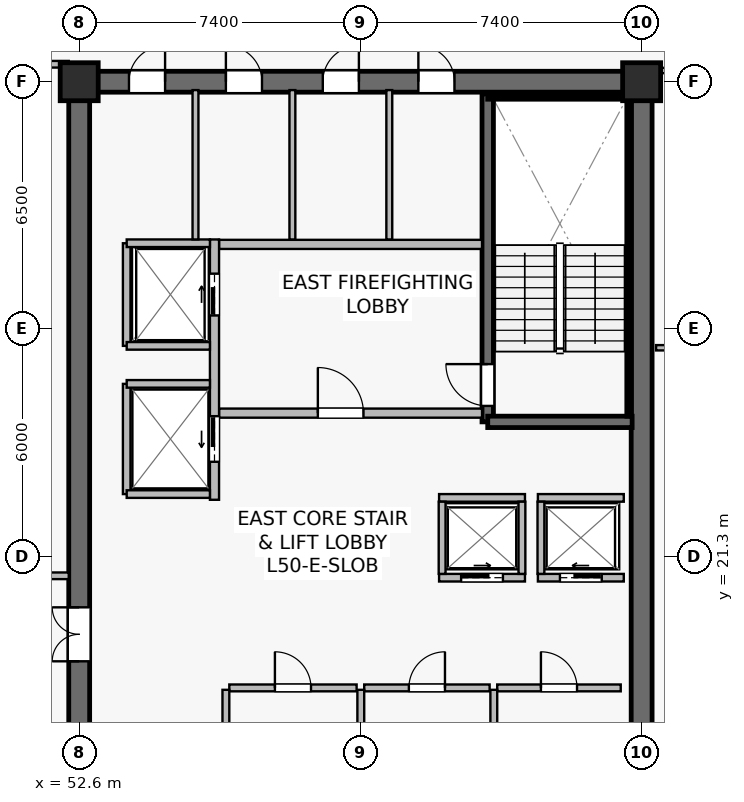
"""IFC4 building model, lengths in metres.
Left out: names, types, materials, properties, quantities, classifications, styles, units other than length and angle.
Written with IfcOpenShell. Run it as: python <this file> out.ifc"""

import sys

from ifc_helpers import new_model, si_unit, direction, frame, frame_2d, origin, origin_2d, place, context, subcontext, project, spatial, rectangle, extrude, source, transform, mapped, element, fill, save


model = new_model("IFC4")
c1 = context("Model", 3, precision=1e-05, world=origin(), true_north=direction((0.0, 1.0)))
c2 = subcontext(c1, "Body", "Model", "MODEL_VIEW")
j1 = project(units=[si_unit("LENGTHUNIT", "METRE"), si_unit("PLANEANGLEUNIT", "RADIAN")], contexts=[c1])
p1 = place(None, origin())
s1 = spatial("IfcSite", under=j1, at=p1, CompositionType="ELEMENT")
p2 = place(p1, origin())
s2 = spatial("IfcBuilding", under=s1, at=p2, CompositionType="ELEMENT")
p3 = place(p2, frame((0.0, 0.0, 209.6)))
s3 = spatial("IfcBuildingStorey", under=s2, at=p3, CompositionType="ELEMENT", Elevation=209.6)
p4 = place(p3, frame((52.325, 33.8, 0.0), z_axis=(0.0, 0.0, 1.0), x_axis=(1.0, 0.0, 0.0)))
e1 = element("IfcWall", 1, at=p4, inside=s3, PredefinedType="SHEAR", context=c2, shape_type="SweptSolid", body=[
    extrude(rectangle(XDim=15.35, YDim=0.55, at=frame_2d((7.675, 0.0))), origin(), (0.0, 0.0, 1.0), 3.8),
])
p5 = place(p4, frame((9.2, 0.0, 0.0)))
e2 = element("IfcOpeningElement", 2, at=p5, cuts=e1, PredefinedType="OPENING", context=c2, shape_type="SweptSolid", body=[
    extrude(rectangle(XDim=0.95, YDim=2.15, at=frame_2d((0.475, 1.075))), frame((0.0, 0.285, 0.0), z_axis=(0.0, -1.0, 0.0), x_axis=(1.0, 0.0, 0.0)), (0.0, 0.0, 1.0), 0.57),
])
p6 = place(p4, frame((6.685, 0.0, 0.0)))
e3 = element("IfcOpeningElement", 3, at=p6, cuts=e1, PredefinedType="OPENING", context=c2, shape_type="SweptSolid", body=[
    extrude(rectangle(XDim=0.95, YDim=2.15, at=frame_2d((0.475, 1.075))), frame((0.0, 0.285, 0.0), z_axis=(0.0, -1.0, 0.0), x_axis=(1.0, 0.0, 0.0)), (0.0, 0.0, 1.0), 0.57),
])
p7 = place(p4, frame((4.135, 0.0, 0.0)))
e4 = element("IfcOpeningElement", 4, at=p7, cuts=e1, PredefinedType="OPENING", context=c2, shape_type="SweptSolid", body=[
    extrude(rectangle(XDim=0.95, YDim=2.15, at=frame_2d((0.475, 1.075))), frame((0.0, 0.285, 0.0), z_axis=(0.0, -1.0, 0.0), x_axis=(1.0, 0.0, 0.0)), (0.0, 0.0, 1.0), 0.57),
])
p8 = place(p4, frame((1.585, 0.0, 0.0)))
e5 = element("IfcOpeningElement", 5, at=p8, cuts=e1, PredefinedType="OPENING", context=c2, shape_type="SweptSolid", body=[
    extrude(rectangle(XDim=0.95, YDim=2.15, at=frame_2d((0.475, 1.075))), frame((0.0, 0.285, 0.0), z_axis=(0.0, -1.0, 0.0), x_axis=(1.0, 0.0, 0.0)), (0.0, 0.0, 1.0), 0.57),
])
p9 = place(p3, frame((52.6, 15.075, 0.0), z_axis=(0.0, 0.0, 1.0), x_axis=(0.0, 1.0, 0.0)))
e6 = element("IfcWall", 6, at=p9, inside=s3, PredefinedType="SHEAR", context=c2, shape_type="SweptSolid", body=[
    extrude(rectangle(XDim=18.45, YDim=0.55, at=frame_2d((9.225, 0.0))), origin(), (0.0, 0.0, 1.0), 3.8),
])
p10 = place(p9, frame((3.475, 0.0, 0.0)))
e7 = element("IfcOpeningElement", 7, at=p10, cuts=e6, PredefinedType="OPENING", context=c2, shape_type="SweptSolid", body=[
    extrude(rectangle(XDim=1.42, YDim=2.2, at=frame_2d((0.71, 1.1))), frame((0.0, 0.285, 0.0), z_axis=(0.0, -1.0, 0.0), x_axis=(1.0, 0.0, 0.0)), (0.0, 0.0, 1.0), 0.57),
])
p11 = place(p3, frame((67.4, 15.075, 0.0), z_axis=(0.0, 0.0, 1.0), x_axis=(0.0, 1.0, 0.0)))
e8 = element("IfcWall", 8, at=p11, inside=s3, PredefinedType="SHEAR", context=c2, shape_type="SweptSolid", body=[
    extrude(rectangle(XDim=18.45, YDim=0.55, at=frame_2d((9.225, 0.0))), origin(), (0.0, 0.0, 1.0), 3.8),
])
p12 = place(p3, frame((63.35, 24.85, 0.0), z_axis=(0.0, 0.0, 1.0), x_axis=(0.0, 1.0, 0.0)))
e9 = element("IfcWall", 9, at=p12, inside=s3, PredefinedType="SHEAR", context=c2, shape_type="SweptSolid", body=[
    extrude(rectangle(XDim=8.63, YDim=0.3, at=frame_2d((4.315, 0.0))), origin(), (0.0, 0.0, 1.0), 3.8),
])
p13 = place(p12, frame((0.42, 0.0, 0.0)))
e10 = element("IfcOpeningElement", 10, at=p13, cuts=e9, PredefinedType="OPENING", context=c2, shape_type="SweptSolid", body=[
    extrude(rectangle(XDim=1.1, YDim=2.15, at=frame_2d((0.55, 1.075))), frame((0.0, 0.16, 0.0), z_axis=(0.0, -1.0, 0.0), x_axis=(1.0, 0.0, 0.0)), (0.0, 0.0, 1.0), 0.32),
])
p14 = place(p3, frame((63.35, 24.85, 0.0), z_axis=(0.0, 0.0, 1.0), x_axis=(1.0, 0.0, 0.0)))
e11 = element("IfcWall", 11, at=p14, inside=s3, PredefinedType="SHEAR", context=c2, shape_type="SweptSolid", body=[
    extrude(rectangle(XDim=3.8, YDim=0.3, at=frame_2d((1.9, 0.0))), origin(), (0.0, 0.0, 1.0), 3.8),
])
p15 = place(p3, frame((63.35, 33.4, 0.0), z_axis=(0.0, 0.0, 1.0), x_axis=(1.0, 0.0, 0.0)))
e12 = element("IfcWall", 12, at=p15, inside=s3, PredefinedType="SOLIDWALL", context=c2, shape_type="SweptSolid", body=[
    extrude(rectangle(XDim=3.72, YDim=0.12, at=frame_2d((1.86, 0.0))), origin(), (0.0, 0.0, 1.0), 3.8),
])
p16 = place(p3, frame((67.07, 25.0, 0.0), z_axis=(0.0, 0.0, 1.0), x_axis=(0.0, 1.0, 0.0)))
e13 = element("IfcWall", 13, at=p16, inside=s3, PredefinedType="SOLIDWALL", context=c2, shape_type="SweptSolid", body=[
    extrude(rectangle(XDim=8.32, YDim=0.12, at=frame_2d((4.16, 0.0))), origin(), (0.0, 0.0, 1.0), 3.8),
])
m1 = source(origin(), c2, "Body", "SweptSolid", [
    extrude(rectangle(XDim=1.0, YDim=1.0, at=origin_2d()), origin(), (0.0, 0.0, 1.0), 4.1),
])
for number, where, z_axis, x_axis in (
    (14, (52.6, 33.8, 0.0), (0.0, 0.0, 1.0), (1.0, 0.0, 0.0)),
    (15, (67.4, 33.8, 0.0), (0.0, 0.0, 1.0), (1.0, 0.0, 0.0)),
):
    element("IfcColumn", number, at=place(p3, frame(where, z_axis=z_axis, x_axis=x_axis)), inside=s3, PredefinedType="COLUMN", context=c2, shape_type="MappedRepresentation", body=[
        mapped(m1, transform((0.0, 0.0, 0.0), scale=1.0)),
    ])
p17 = place(p3, frame((56.28, 25.08, 0.0), z_axis=(0.0, 0.0, 1.0), x_axis=(1.0, 0.0, 0.0)))
e16 = element("IfcWall", 16, at=p17, inside=s3, PredefinedType="SOLIDWALL", context=c2, shape_type="SweptSolid", body=[
    extrude(rectangle(XDim=6.92, YDim=0.24, at=frame_2d((3.46, 0.0))), origin(), (0.0, 0.0, 1.0), 3.197),
])
p18 = place(p17, frame((2.6, 0.0, 0.0)))
e17 = element("IfcOpeningElement", 17, at=p18, cuts=e16, PredefinedType="OPENING", context=c2, shape_type="SweptSolid", body=[
    extrude(rectangle(XDim=1.2, YDim=2.16, at=frame_2d((0.6, 1.08))), frame((0.0, 0.13, 0.0), z_axis=(0.0, -1.0, 0.0), x_axis=(1.0, 0.0, 0.0)), (0.0, 0.0, 1.0), 0.26),
])
p19 = place(p3, frame((56.28, 29.52, 0.0), z_axis=(0.0, 0.0, 1.0), x_axis=(1.0, 0.0, 0.0)))
e18 = element("IfcWall", 18, at=p19, inside=s3, PredefinedType="SOLIDWALL", context=c2, shape_type="SweptSolid", body=[
    extrude(rectangle(XDim=6.92, YDim=0.24, at=frame_2d((3.46, 0.0))), origin(), (0.0, 0.0, 1.0), 3.197),
])
p20 = place(p3, frame((56.16, 22.8, 0.0), z_axis=(0.0, 0.0, 1.0), x_axis=(0.0, 1.0, 0.0)))
e19 = element("IfcWall", 19, at=p20, inside=s3, PredefinedType="SOLIDWALL", context=c2, shape_type="SweptSolid", body=[
    extrude(rectangle(XDim=6.85, YDim=0.24, at=frame_2d((3.425, 0.0))), origin(), (0.0, 0.0, 1.0), 2.935),
])
p21 = place(p20, frame((4.85, 0.0, 0.0)))
e20 = element("IfcOpeningElement", 20, at=p21, cuts=e19, PredefinedType="OPENING", context=c2, shape_type="SweptSolid", body=[
    extrude(rectangle(XDim=1.1, YDim=2.22, at=frame_2d((0.55, 1.11))), frame((0.0, 0.13, 0.0), z_axis=(0.0, -1.0, 0.0), x_axis=(1.0, 0.0, 0.0)), (0.0, 0.0, 1.0), 0.26),
])
p22 = place(p20, frame((1.0, 0.0, 0.0)))
e21 = element("IfcOpeningElement", 21, at=p22, cuts=e19, PredefinedType="OPENING", context=c2, shape_type="SweptSolid", body=[
    extrude(rectangle(XDim=1.2, YDim=2.22, at=frame_2d((0.6, 1.11))), frame((0.0, 0.13, 0.0), z_axis=(0.0, -1.0, 0.0), x_axis=(1.0, 0.0, 0.0)), (0.0, 0.0, 1.0), 0.26),
])
p23 = place(p3, frame((64.67, 20.75, 0.0), z_axis=(0.0, 0.0, 1.0), x_axis=(1.0, 0.0, 0.0)))
e22 = element("IfcWall", 22, at=p23, inside=s3, PredefinedType="SOLIDWALL", context=c2, shape_type="SweptSolid", body=[
    extrude(rectangle(XDim=2.26, YDim=0.2, at=frame_2d((1.13, 0.0))), origin(), (0.0, 0.0, 1.0), 3.8),
])
p24 = place(p23, frame((0.58, 0.0, 0.0)))
e23 = element("IfcOpeningElement", 23, at=p24, cuts=e22, PredefinedType="OPENING", context=c2, shape_type="SweptSolid", body=[
    extrude(rectangle(XDim=1.1, YDim=2.22, at=frame_2d((0.55, 1.11))), frame((0.0, 0.11, 0.0), z_axis=(0.0, -1.0, 0.0), x_axis=(1.0, 0.0, 0.0)), (0.0, 0.0, 1.0), 0.22),
])
p25 = place(p3, frame((64.67, 22.85, 0.0), z_axis=(0.0, 0.0, 1.0), x_axis=(1.0, 0.0, 0.0)))
e24 = element("IfcWall", 24, at=p25, inside=s3, PredefinedType="SOLIDWALL", context=c2, shape_type="SweptSolid", body=[
    extrude(rectangle(XDim=2.26, YDim=0.2, at=frame_2d((1.13, 0.0))), origin(), (0.0, 0.0, 1.0), 3.8),
])
p26 = place(p3, frame((64.75, 20.85, 0.0), z_axis=(0.0, 0.0, 1.0), x_axis=(0.0, 1.0, 0.0)))
e25 = element("IfcWall", 25, at=p26, inside=s3, PredefinedType="SOLIDWALL", context=c2, shape_type="SweptSolid", body=[
    extrude(rectangle(XDim=1.9, YDim=0.18, at=frame_2d((0.95, 0.0))), origin(), (0.0, 0.0, 1.0), 3.8),
])
p27 = place(p3, frame((62.07, 20.75, 0.0), z_axis=(0.0, 0.0, 1.0), x_axis=(1.0, 0.0, 0.0)))
e26 = element("IfcWall", 26, at=p27, inside=s3, PredefinedType="SOLIDWALL", context=c2, shape_type="SweptSolid", body=[
    extrude(rectangle(XDim=2.26, YDim=0.2, at=frame_2d((1.13, 0.0))), origin(), (0.0, 0.0, 1.0), 3.8),
])
p28 = place(p27, frame((0.58, 0.0, 0.0)))
e27 = element("IfcOpeningElement", 27, at=p28, cuts=e26, PredefinedType="OPENING", context=c2, shape_type="SweptSolid", body=[
    extrude(rectangle(XDim=1.1, YDim=2.22, at=frame_2d((0.55, 1.11))), frame((0.0, 0.11, 0.0), z_axis=(0.0, -1.0, 0.0), x_axis=(1.0, 0.0, 0.0)), (0.0, 0.0, 1.0), 0.22),
])
p29 = place(p3, frame((62.07, 22.85, 0.0), z_axis=(0.0, 0.0, 1.0), x_axis=(1.0, 0.0, 0.0)))
e28 = element("IfcWall", 28, at=p29, inside=s3, PredefinedType="SOLIDWALL", context=c2, shape_type="SweptSolid", body=[
    extrude(rectangle(XDim=2.26, YDim=0.2, at=frame_2d((1.13, 0.0))), origin(), (0.0, 0.0, 1.0), 3.8),
])
for number, where, z_axis, x_axis in (
    (29, (62.15, 20.85, 0.0), (0.0, 0.0, 1.0), (0.0, 1.0, 0.0)),
    (30, (64.25, 20.85, 0.0), (0.0, 0.0, 1.0), (0.0, 1.0, 0.0)),
):
    element("IfcWall", number, at=place(p3, frame(where, z_axis=z_axis, x_axis=x_axis)), inside=s3, PredefinedType="SOLIDWALL", context=c2, shape_type="SweptSolid", body=[
        extrude(rectangle(XDim=1.9, YDim=0.18, at=frame_2d((0.95, 0.0))), origin(), (0.0, 0.0, 1.0), 3.8),
    ])
p30 = place(p3, frame((53.85, 26.85, 0.0), z_axis=(0.0, 0.0, 1.0), x_axis=(0.0, 1.0, 0.0)))
e31 = element("IfcWall", 31, at=p30, inside=s3, PredefinedType="SOLIDWALL", context=c2, shape_type="SweptSolid", body=[
    extrude(rectangle(XDim=2.7, YDim=0.2, at=frame_2d((1.35, 0.0))), origin(), (0.0, 0.0, 1.0), 3.8),
])
p31 = place(p3, frame((53.85, 29.55, 0.0), z_axis=(0.0, 0.0, 1.0), x_axis=(1.0, 0.0, 0.0)))
e32 = element("IfcWall", 32, at=p31, inside=s3, PredefinedType="SOLIDWALL", context=c2, shape_type="SweptSolid", body=[
    extrude(rectangle(XDim=2.19, YDim=0.2, at=frame_2d((1.095, 0.0))), origin(), (0.0, 0.0, 1.0), 3.8),
])
p32 = place(p3, frame((53.85, 26.85, 0.0), z_axis=(0.0, 0.0, 1.0), x_axis=(1.0, 0.0, 0.0)))
e33 = element("IfcWall", 33, at=p32, inside=s3, PredefinedType="SOLIDWALL", context=c2, shape_type="SweptSolid", body=[
    extrude(rectangle(XDim=2.19, YDim=0.2, at=frame_2d((1.095, 0.0))), origin(), (0.0, 0.0, 1.0), 3.197),
])
p33 = place(p3, frame((53.85, 22.95, 0.0), z_axis=(0.0, 0.0, 1.0), x_axis=(0.0, 1.0, 0.0)))
e34 = element("IfcWall", 34, at=p33, inside=s3, PredefinedType="SOLIDWALL", context=c2, shape_type="SweptSolid", body=[
    extrude(rectangle(XDim=2.9, YDim=0.2, at=frame_2d((1.45, 0.0))), origin(), (0.0, 0.0, 1.0), 2.935),
])
for number, where, z_axis, x_axis in (
    (35, (53.85, 25.85, 0.0), (0.0, 0.0, 1.0), (1.0, 0.0, 0.0)),
    (36, (53.85, 22.95, 0.0), (0.0, 0.0, 1.0), (1.0, 0.0, 0.0)),
):
    element("IfcWall", number, at=place(p3, frame(where, z_axis=z_axis, x_axis=x_axis)), inside=s3, PredefinedType="SOLIDWALL", context=c2, shape_type="SweptSolid", body=[
        extrude(rectangle(XDim=2.19, YDim=0.2, at=frame_2d((1.095, 0.0))), origin(), (0.0, 0.0, 1.0), 3.8),
    ])
p34 = place(p3, frame((63.6, 17.85, 0.0), z_axis=(0.0, 0.0, 1.0), x_axis=(1.0, 0.0, 0.0)))
e37 = element("IfcWall", 37, at=p34, inside=s3, PredefinedType="SOLIDWALL", context=c2, shape_type="SweptSolid", body=[
    extrude(rectangle(XDim=3.25, YDim=0.18, at=frame_2d((1.625, 0.0))), origin(), (0.0, 0.0, 1.0), 3.8),
])
p35 = place(p34, frame((1.15, 0.0, 0.0)))
e38 = element("IfcOpeningElement", 38, at=p35, cuts=e37, PredefinedType="OPENING", context=c2, shape_type="SweptSolid", body=[
    extrude(rectangle(XDim=0.95, YDim=2.15, at=frame_2d((0.475, 1.075))), frame((0.0, 0.1, 0.0), z_axis=(0.0, -1.0, 0.0), x_axis=(1.0, 0.0, 0.0)), (0.0, 0.0, 1.0), 0.2),
])
p36 = place(p3, frame((63.51, 15.4, 0.0), z_axis=(0.0, 0.0, 1.0), x_axis=(0.0, 1.0, 0.0)))
e39 = element("IfcWall", 39, at=p36, inside=s3, PredefinedType="SOLIDWALL", context=c2, shape_type="SweptSolid", body=[
    extrude(rectangle(XDim=2.4, YDim=0.18, at=frame_2d((1.2, 0.0))), origin(), (0.0, 0.0, 1.0), 3.8),
])
p37 = place(p3, frame((60.1, 17.85, 0.0), z_axis=(0.0, 0.0, 1.0), x_axis=(1.0, 0.0, 0.0)))
e40 = element("IfcWall", 40, at=p37, inside=s3, PredefinedType="SOLIDWALL", context=c2, shape_type="SweptSolid", body=[
    extrude(rectangle(XDim=3.3, YDim=0.18, at=frame_2d((1.65, 0.0))), origin(), (0.0, 0.0, 1.0), 3.197),
])
p38 = place(p37, frame((1.175, 0.0, 0.0)))
e41 = element("IfcOpeningElement", 41, at=p38, cuts=e40, PredefinedType="OPENING", context=c2, shape_type="SweptSolid", body=[
    extrude(rectangle(XDim=0.95, YDim=2.15, at=frame_2d((0.475, 1.075))), frame((0.0, 0.1, 0.0), z_axis=(0.0, -1.0, 0.0), x_axis=(1.0, 0.0, 0.0)), (0.0, 0.0, 1.0), 0.2),
])
p39 = place(p3, frame((60.01, 15.4, 0.0), z_axis=(0.0, 0.0, 1.0), x_axis=(0.0, 1.0, 0.0)))
e42 = element("IfcWall", 42, at=p39, inside=s3, PredefinedType="SOLIDWALL", context=c2, shape_type="SweptSolid", body=[
    extrude(rectangle(XDim=2.4, YDim=0.18, at=frame_2d((1.2, 0.0))), origin(), (0.0, 0.0, 1.0), 3.197),
])
p40 = place(p3, frame((56.55, 17.85, 0.0), z_axis=(0.0, 0.0, 1.0), x_axis=(1.0, 0.0, 0.0)))
e43 = element("IfcWall", 43, at=p40, inside=s3, PredefinedType="SOLIDWALL", context=c2, shape_type="SweptSolid", body=[
    extrude(rectangle(XDim=3.35, YDim=0.18, at=frame_2d((1.675, 0.0))), origin(), (0.0, 0.0, 1.0), 3.197),
])
p41 = place(p40, frame((1.2, 0.0, 0.0)))
e44 = element("IfcOpeningElement", 44, at=p41, cuts=e43, PredefinedType="OPENING", context=c2, shape_type="SweptSolid", body=[
    extrude(rectangle(XDim=0.95, YDim=2.15, at=frame_2d((0.475, 1.075))), frame((0.0, 0.1, 0.0), z_axis=(0.0, -1.0, 0.0), x_axis=(1.0, 0.0, 0.0)), (0.0, 0.0, 1.0), 0.2),
])
p42 = place(p3, frame((56.46, 15.4, 0.0), z_axis=(0.0, 0.0, 1.0), x_axis=(0.0, 1.0, 0.0)))
e45 = element("IfcWall", 45, at=p42, inside=s3, PredefinedType="SOLIDWALL", context=c2, shape_type="SweptSolid", body=[
    extrude(rectangle(XDim=2.4, YDim=0.18, at=frame_2d((1.2, 0.0))), origin(), (0.0, 0.0, 1.0), 3.8),
])
for number, where, z_axis, x_axis in (
    (46, (60.76, 29.65, 0.0), (0.0, 0.0, 1.0), (0.0, 1.0, 0.0)),
    (47, (58.21, 29.65, 0.0), (0.0, 0.0, 1.0), (0.0, 1.0, 0.0)),
    (48, (55.66, 29.65, 0.0), (0.0, 0.0, 1.0), (0.0, 1.0, 0.0)),
):
    element("IfcWall", number, at=place(p3, frame(where, z_axis=z_axis, x_axis=x_axis)), inside=s3, PredefinedType="PLUMBINGWALL", context=c2, shape_type="SweptSolid", body=[
        extrude(rectangle(XDim=3.93, YDim=0.155, at=frame_2d((1.965, 0.0))), origin(), (0.0, 0.0, 1.0), 3.8),
    ])
p43 = place(p3, frame((48.3, 34.26, 0.0), z_axis=(0.0, 0.0, 1.0), x_axis=(1.0, 0.0, 0.0)))
e49 = element("IfcWall", 49, at=p43, inside=s3, PredefinedType="PARTITIONING", context=c2, shape_type="SweptSolid", body=[
    extrude(rectangle(XDim=4.025, YDim=0.175, at=frame_2d((2.012, 0.0))), origin(), (0.0, 0.0, 1.0), 3.485),
])
p44 = place(p3, frame((48.3, 20.8, 0.0), z_axis=(0.0, 0.0, 1.0), x_axis=(1.0, 0.0, 0.0)))
e50 = element("IfcWall", 50, at=p44, inside=s3, PredefinedType="PARTITIONING", context=c2, shape_type="SweptSolid", body=[
    extrude(rectangle(XDim=4.025, YDim=0.175, at=frame_2d((2.012, 0.0))), origin(), (0.0, 0.0, 1.0), 3.8),
])
p45 = place(p44, frame((1.35, 0.0, 0.0)))
e51 = element("IfcOpeningElement", 51, at=p45, cuts=e50, PredefinedType="OPENING", context=c2, shape_type="SweptSolid", body=[
    extrude(rectangle(XDim=0.95, YDim=2.15, at=frame_2d((0.475, 1.075))), frame((0.0, 0.098, 0.0), z_axis=(0.0, -1.0, 0.0), x_axis=(1.0, 0.0, 0.0)), (0.0, 0.0, 1.0), 0.195),
])
p46 = place(p3, frame((67.78, 26.8, 0.0), z_axis=(0.0, 0.0, 1.0), x_axis=(1.0, 0.0, 0.0)))
e52 = element("IfcWall", 52, at=p46, inside=s3, PredefinedType="PARTITIONING", context=c2, shape_type="SweptSolid", body=[
    extrude(rectangle(XDim=2.91, YDim=0.14, at=frame_2d((1.455, 0.0))), origin(), (0.0, 0.0, 1.0), 3.8),
])
p47 = place(p3, frame((67.78, 34.095, 0.0), z_axis=(0.0, 0.0, 1.0), x_axis=(1.0, 0.0, 0.0)))
e53 = element("IfcWall", 53, at=p47, inside=s3, PredefinedType="PARTITIONING", context=c2, shape_type="SweptSolid", body=[
    extrude(rectangle(XDim=2.91, YDim=0.14, at=frame_2d((1.455, 0.0))), origin(), (0.0, 0.0, 1.0), 3.8),
])
p48 = place(p47, frame((1.005, 0.0, 0.0)))
e54 = element("IfcOpeningElement", 54, at=p48, cuts=e53, PredefinedType="OPENING", context=c2, shape_type="SweptSolid", body=[
    extrude(rectangle(XDim=0.9, YDim=2.1, at=frame_2d((0.45, 1.05))), frame((0.0, 0.08, 0.0), z_axis=(0.0, -1.0, 0.0), x_axis=(1.0, 0.0, 0.0)), (0.0, 0.0, 1.0), 0.16),
])
m2 = source(origin(), c2, "Body", "SweptSolid", [
    extrude(rectangle(XDim=1.1, YDim=2.15, at=frame_2d((0.55, 1.075))), frame((0.0, 0.025, 0.0), z_axis=(0.0, -1.0, 0.0), x_axis=(1.0, 0.0, 0.0)), (0.0, 0.0, 1.0), 0.05),
])
p49 = place(p13, origin())
e55 = element("IfcDoor", 55, at=p49, inside=s3, OperationType="SINGLE_SWING_RIGHT", PredefinedType="DOOR", context=c2, shape_type="MappedRepresentation", body=[
    mapped(m2, transform((0.0, 0.0, 0.0), scale=1.0)),
])
fill(e10, e55)
m3 = source(origin(), c2, "Body", "SweptSolid", [
    extrude(rectangle(XDim=1.2, YDim=2.16, at=frame_2d((0.6, 1.08))), frame((0.0, 0.025, 0.0), z_axis=(0.0, -1.0, 0.0), x_axis=(1.0, 0.0, 0.0)), (0.0, 0.0, 1.0), 0.05),
])
p50 = place(p18, origin())
e56 = element("IfcDoor", 56, at=p50, inside=s3, OperationType="SINGLE_SWING_LEFT", PredefinedType="DOOR", context=c2, shape_type="MappedRepresentation", body=[
    mapped(m3, transform((0.0, 0.0, 0.0), scale=1.0)),
])
fill(e17, e56)
m4 = source(origin(), c2, "Body", "SweptSolid", [
    extrude(rectangle(XDim=1.1, YDim=2.22, at=frame_2d((0.55, 1.11))), frame((0.0, 0.025, 0.0), z_axis=(0.0, -1.0, 0.0), x_axis=(1.0, 0.0, 0.0)), (0.0, 0.0, 1.0), 0.05),
])
p51 = place(p24, origin())
e57 = element("IfcDoor", 57, at=p51, inside=s3, OperationType="SLIDING_TO_LEFT", PredefinedType="USERDEFINED", context=c2, shape_type="MappedRepresentation", body=[
    mapped(m4, transform((0.0, 0.0, 0.0), scale=1.0)),
])
fill(e23, e57)
p52 = place(p28, origin())
e58 = element("IfcDoor", 58, at=p52, inside=s3, OperationType="SLIDING_TO_RIGHT", PredefinedType="USERDEFINED", context=c2, shape_type="MappedRepresentation", body=[
    mapped(m4, transform((0.0, 0.0, 0.0), scale=1.0)),
])
fill(e27, e58)
p53 = place(p21, origin())
e59 = element("IfcDoor", 59, at=p53, inside=s3, OperationType="SLIDING_TO_RIGHT", PredefinedType="USERDEFINED", context=c2, shape_type="MappedRepresentation", body=[
    mapped(m4, transform((0.0, 0.0, 0.0), scale=1.0)),
])
fill(e20, e59)
m5 = source(origin(), c2, "Body", "SweptSolid", [
    extrude(rectangle(XDim=1.2, YDim=2.22, at=frame_2d((0.6, 1.11))), frame((0.0, 0.025, 0.0), z_axis=(0.0, -1.0, 0.0), x_axis=(1.0, 0.0, 0.0)), (0.0, 0.0, 1.0), 0.05),
])
p54 = place(p22, origin())
e60 = element("IfcDoor", 60, at=p54, inside=s3, OperationType="SLIDING_TO_LEFT", PredefinedType="USERDEFINED", context=c2, shape_type="MappedRepresentation", body=[
    mapped(m5, transform((0.0, 0.0, 0.0), scale=1.0)),
])
fill(e21, e60)
m6 = source(origin(), c2, "Body", "SweptSolid", [
    extrude(rectangle(XDim=0.95, YDim=2.15, at=frame_2d((0.475, 1.075))), frame((0.0, 0.025, 0.0), z_axis=(0.0, -1.0, 0.0), x_axis=(1.0, 0.0, 0.0)), (0.0, 0.0, 1.0), 0.05),
])
p55 = place(p35, origin())
e61 = element("IfcDoor", 61, at=p55, inside=s3, OperationType="SINGLE_SWING_LEFT", PredefinedType="DOOR", context=c2, shape_type="MappedRepresentation", body=[
    mapped(m6, transform((0.0, 0.0, 0.0), scale=1.0)),
])
fill(e38, e61)
p56 = place(p38, origin())
e62 = element("IfcDoor", 62, at=p56, inside=s3, OperationType="SINGLE_SWING_RIGHT", PredefinedType="DOOR", context=c2, shape_type="MappedRepresentation", body=[
    mapped(m6, transform((0.0, 0.0, 0.0), scale=1.0)),
])
fill(e41, e62)
p57 = place(p41, origin())
e63 = element("IfcDoor", 63, at=p57, inside=s3, OperationType="SINGLE_SWING_LEFT", PredefinedType="DOOR", context=c2, shape_type="MappedRepresentation", body=[
    mapped(m6, transform((0.0, 0.0, 0.0), scale=1.0)),
])
fill(e44, e63)
m7 = source(origin(), c2, "Body", "SweptSolid", [
    extrude(rectangle(XDim=1.42, YDim=2.2, at=frame_2d((0.71, 1.1))), frame((0.0, 0.025, 0.0), z_axis=(0.0, -1.0, 0.0), x_axis=(1.0, 0.0, 0.0)), (0.0, 0.0, 1.0), 0.05),
])
p58 = place(p10, origin())
e64 = element("IfcDoor", 64, at=p58, inside=s3, OperationType="DOUBLE_DOOR_SINGLE_SWING", PredefinedType="DOOR", context=c2, shape_type="MappedRepresentation", body=[
    mapped(m7, transform((0.0, 0.0, 0.0), scale=1.0)),
])
fill(e7, e64)
p59 = place(p5, origin())
e65 = element("IfcDoor", 65, at=p59, inside=s3, OperationType="SINGLE_SWING_LEFT", PredefinedType="DOOR", context=c2, shape_type="MappedRepresentation", body=[
    mapped(m6, transform((0.0, 0.0, 0.0), scale=1.0)),
])
fill(e2, e65)
p60 = place(p6, origin())
e66 = element("IfcDoor", 66, at=p60, inside=s3, OperationType="SINGLE_SWING_RIGHT", PredefinedType="DOOR", context=c2, shape_type="MappedRepresentation", body=[
    mapped(m6, transform((0.0, 0.0, 0.0), scale=1.0)),
])
fill(e3, e66)
p61 = place(p7, origin())
e67 = element("IfcDoor", 67, at=p61, inside=s3, OperationType="SINGLE_SWING_LEFT", PredefinedType="DOOR", context=c2, shape_type="MappedRepresentation", body=[
    mapped(m6, transform((0.0, 0.0, 0.0), scale=1.0)),
])
fill(e4, e67)
p62 = place(p8, origin())
e68 = element("IfcDoor", 68, at=p62, inside=s3, OperationType="SINGLE_SWING_RIGHT", PredefinedType="DOOR", context=c2, shape_type="MappedRepresentation", body=[
    mapped(m6, transform((0.0, 0.0, 0.0), scale=1.0)),
])
fill(e5, e68)
save(model, sys.argv[1])
